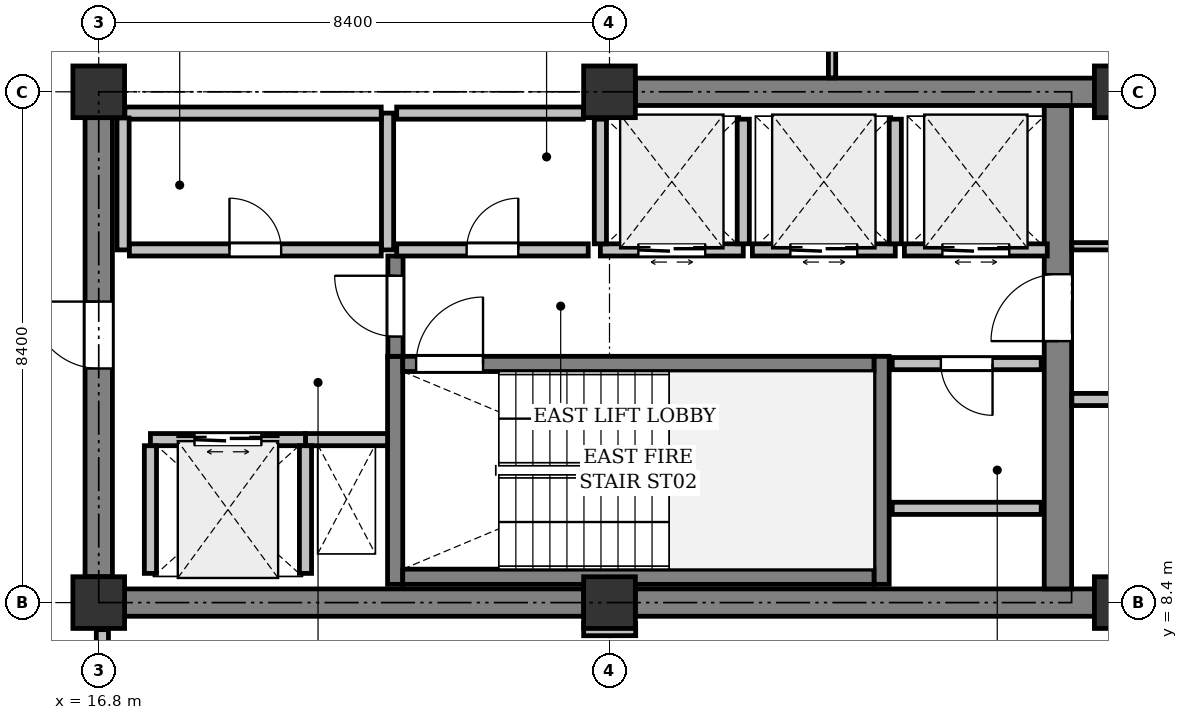
"""IFC4 building model, lengths in metres.
Left out: names, types, materials, properties, quantities, classifications, styles, units other than length and angle.
Written with IfcOpenShell. Run it as: python <this file> out.ifc"""

import sys

from ifc_helpers import new_model, si_unit, direction, frame, frame_2d, origin, origin_2d, place, context, subcontext, project, spatial, rectangle, extrude, element, fill, save


model = new_model("IFC4")
c1 = context("Model", 3, precision=1e-05, world=origin(), true_north=direction((0.0, 1.0)))
c2 = subcontext(c1, "Body", "Model", "MODEL_VIEW")
j1 = project(units=[si_unit("LENGTHUNIT", "METRE"), si_unit("PLANEANGLEUNIT", "RADIAN")], contexts=[c1])
p1 = place(None, origin())
s1 = spatial("IfcSite", under=j1, at=p1, CompositionType="ELEMENT")
p2 = place(p1, origin())
s2 = spatial("IfcBuilding", under=s1, at=p2, CompositionType="ELEMENT")
p3 = place(p2, frame((0.0, 0.0, 274.2)))
s3 = spatial("IfcBuildingStorey", under=s2, at=p3, CompositionType="ELEMENT", Elevation=274.2)
for number, where, z_axis, x_axis in (
    (1, (16.8, 8.4, 0.0), (0.0, 0.0, 1.0), (1.0, 0.0, 0.0)),
    (2, (16.8, 16.8, 0.0), (0.0, 0.0, 1.0), (1.0, 0.0, 0.0)),
    (3, (25.2, 8.4, 0.0), (0.0, 0.0, 1.0), (1.0, 0.0, 0.0)),
    (4, (25.2, 16.8, 0.0), (0.0, 0.0, 1.0), (1.0, 0.0, 0.0)),
    (5, (33.6, 8.4, 0.0), (0.0, 0.0, 1.0), (1.0, 0.0, 0.0)),
    (6, (33.6, 16.8, 0.0), (0.0, 0.0, 1.0), (1.0, 0.0, 0.0)),
):
    element("IfcColumn", number, at=place(p3, frame(where, z_axis=z_axis, x_axis=x_axis)), inside=s3, PredefinedType="COLUMN", context=c2, shape_type="SweptSolid", body=[
        extrude(rectangle(XDim=0.85, YDim=0.85, at=origin_2d()), origin(), (0.0, 0.0, 1.0), 4.0),
    ])
p4 = place(p3, frame((17.225, 8.4, 0.0), z_axis=(0.0, 0.0, 1.0), x_axis=(1.0, 0.0, 0.0)))
e7 = element("IfcWall", 7, at=p4, inside=s3, PredefinedType="SHEAR", context=c2, shape_type="SweptSolid", body=[
    extrude(rectangle(XDim=7.55, YDim=0.45, at=frame_2d((3.775, 0.0))), origin(), (0.0, 0.0, 1.0), 3.725),
])
p5 = place(p3, frame((25.625, 8.4, 0.0), z_axis=(0.0, 0.0, 1.0), x_axis=(1.0, 0.0, 0.0)))
e8 = element("IfcWall", 8, at=p5, inside=s3, PredefinedType="SHEAR", context=c2, shape_type="SweptSolid", body=[
    extrude(rectangle(XDim=7.55, YDim=0.45, at=frame_2d((3.775, 0.0))), origin(), (0.0, 0.0, 1.0), 3.725),
])
p6 = place(p3, frame((32.575, 8.625, 0.0), z_axis=(0.0, 0.0, 1.0), x_axis=(0.0, 1.0, 0.0)))
e9 = element("IfcWall", 9, at=p6, inside=s3, PredefinedType="SHEAR", context=c2, shape_type="SweptSolid", body=[
    extrude(rectangle(XDim=7.95, YDim=0.45, at=frame_2d((3.975, 0.0))), origin(), (0.0, 0.0, 1.0), 3.725),
])
p7 = place(p6, frame((4.075, 0.0, 0.0)))
e10 = element("IfcOpeningElement", 10, at=p7, cuts=e9, PredefinedType="OPENING", context=c2, shape_type="SweptSolid", body=[
    extrude(rectangle(XDim=1.1, YDim=2.15, at=frame_2d((0.55, 1.075))), frame((0.0, 0.235, 0.0), z_axis=(0.0, -1.0, 0.0), x_axis=(1.0, 0.0, 0.0)), (0.0, 0.0, 1.0), 0.47),
])
p8 = place(p3, frame((16.8, 8.825, 0.0), z_axis=(0.0, 0.0, 1.0), x_axis=(0.0, 1.0, 0.0)))
e11 = element("IfcWall", 11, at=p8, inside=s3, PredefinedType="SHEAR", context=c2, shape_type="SweptSolid", body=[
    extrude(rectangle(XDim=7.55, YDim=0.45, at=frame_2d((3.775, 0.0))), origin(), (0.0, 0.0, 1.0), 3.725),
])
p9 = place(p8, frame((3.425, 0.0, 0.0)))
e12 = element("IfcOpeningElement", 12, at=p9, cuts=e11, PredefinedType="OPENING", context=c2, shape_type="SweptSolid", body=[
    extrude(rectangle(XDim=1.1, YDim=2.15, at=frame_2d((0.55, 1.075))), frame((0.0, 0.235, 0.0), z_axis=(0.0, -1.0, 0.0), x_axis=(1.0, 0.0, 0.0)), (0.0, 0.0, 1.0), 0.47),
])
p10 = place(p3, frame((25.625, 16.8, 0.0), z_axis=(0.0, 0.0, 1.0), x_axis=(1.0, 0.0, 0.0)))
e13 = element("IfcWall", 13, at=p10, inside=s3, PredefinedType="SHEAR", context=c2, shape_type="SweptSolid", body=[
    extrude(rectangle(XDim=7.55, YDim=0.45, at=frame_2d((3.775, 0.0))), origin(), (0.0, 0.0, 1.0), 3.725),
])
for number, where, z_axis, x_axis in (
    (14, (21.675, 8.7, 0.0), (0.0, 0.0, 1.0), (0.0, 1.0, 0.0)),
    (15, (29.675, 8.7, 0.0), (0.0, 0.0, 1.0), (0.0, 1.0, 0.0)),
):
    element("IfcWall", number, at=place(p3, frame(where, z_axis=z_axis, x_axis=x_axis)), inside=s3, PredefinedType="SHEAR", context=c2, shape_type="SweptSolid", body=[
        extrude(rectangle(XDim=3.75, YDim=0.25, at=frame_2d((1.875, 0.0))), origin(), (0.0, 0.0, 1.0), 3.725),
    ])
p11 = place(p3, frame((21.8, 8.825, 0.0), z_axis=(0.0, 0.0, 1.0), x_axis=(1.0, 0.0, 0.0)))
e16 = element("IfcWall", 16, at=p11, inside=s3, PredefinedType="SHEAR", context=c2, shape_type="SweptSolid", body=[
    extrude(rectangle(XDim=7.75, YDim=0.25, at=frame_2d((3.875, 0.0))), origin(), (0.0, 0.0, 1.0), 3.725),
])
p12 = place(p3, frame((21.8, 12.325, 0.0), z_axis=(0.0, 0.0, 1.0), x_axis=(1.0, 0.0, 0.0)))
e17 = element("IfcWall", 17, at=p12, inside=s3, PredefinedType="SHEAR", context=c2, shape_type="SweptSolid", body=[
    extrude(rectangle(XDim=7.75, YDim=0.25, at=frame_2d((3.875, 0.0))), origin(), (0.0, 0.0, 1.0), 3.725),
])
p13 = place(p12, frame((0.22, 0.0, 0.0)))
e18 = element("IfcOpeningElement", 18, at=p13, cuts=e17, PredefinedType="OPENING", context=c2, shape_type="SweptSolid", body=[
    extrude(rectangle(XDim=1.1, YDim=2.15, at=frame_2d((0.55, 1.075))), frame((0.0, 0.135, 0.0), z_axis=(0.0, -1.0, 0.0), x_axis=(1.0, 0.0, 0.0)), (0.0, 0.0, 1.0), 0.27),
])
p14 = place(p3, frame((20.2, 11.08, 0.0), z_axis=(0.0, 0.0, 1.0), x_axis=(1.0, 0.0, 0.0)))
e19 = element("IfcWall", 19, at=p14, inside=s3, PredefinedType="PARTITIONING", context=c2, shape_type="SweptSolid", body=[
    extrude(rectangle(XDim=1.35, YDim=0.2, at=frame_2d((0.675, 0.0))), origin(), (0.0, 0.0, 1.0), 3.725),
])
p15 = place(p3, frame((21.68, 12.45, 0.0), z_axis=(0.0, 0.0, 1.0), x_axis=(0.0, 1.0, 0.0)))
e20 = element("IfcWall", 20, at=p15, inside=s3, PredefinedType="SHEAR", context=c2, shape_type="SweptSolid", body=[
    extrude(rectangle(XDim=1.65, YDim=0.25, at=frame_2d((0.825, 0.0))), origin(), (0.0, 0.0, 1.0), 3.725),
])
p16 = place(p15, frame((0.325, 0.0, 0.0)))
e21 = element("IfcOpeningElement", 21, at=p16, cuts=e20, PredefinedType="OPENING", context=c2, shape_type="SweptSolid", body=[
    extrude(rectangle(XDim=1.0, YDim=2.15, at=frame_2d((0.5, 1.075))), frame((0.0, 0.135, 0.0), z_axis=(0.0, -1.0, 0.0), x_axis=(1.0, 0.0, 0.0)), (0.0, 0.0, 1.0), 0.27),
])
p17 = place(p3, frame((17.65, 11.08, 0.0), z_axis=(0.0, 0.0, 1.0), x_axis=(1.0, 0.0, 0.0)))
e22 = element("IfcWall", 22, at=p17, inside=s3, PredefinedType="PARTITIONING", context=c2, shape_type="SweptSolid", body=[
    extrude(rectangle(XDim=2.55, YDim=0.2, at=frame_2d((1.275, 0.0))), origin(), (0.0, 0.0, 1.0), 3.725),
])
p18 = place(p17, frame((0.725, 0.0, 0.0)))
e23 = element("IfcOpeningElement", 23, at=p18, cuts=e22, PredefinedType="OPENING", context=c2, shape_type="SweptSolid", body=[
    extrude(rectangle(XDim=1.1, YDim=2.2, at=frame_2d((0.55, 1.1))), frame((0.0, 0.11, 0.0), z_axis=(0.0, -1.0, 0.0), x_axis=(1.0, 0.0, 0.0)), (0.0, 0.0, 1.0), 0.22),
])
for number, where, z_axis, x_axis in (
    (24, (20.2, 8.88, 0.0), (0.0, 0.0, 1.0), (0.0, 1.0, 0.0)),
    (25, (17.65, 8.88, 0.0), (0.0, 0.0, 1.0), (0.0, 1.0, 0.0)),
):
    element("IfcWall", number, at=place(p3, frame(where, z_axis=z_axis, x_axis=x_axis)), inside=s3, PredefinedType="PARTITIONING", context=c2, shape_type="SweptSolid", body=[
        extrude(rectangle(XDim=2.1, YDim=0.2, at=frame_2d((1.05, 0.0))), origin(), (0.0, 0.0, 1.0), 3.725),
    ])
p19 = place(p3, frame((25.05, 14.2, 0.0), z_axis=(0.0, 0.0, 1.0), x_axis=(1.0, 0.0, 0.0)))
e26 = element("IfcWall", 26, at=p19, inside=s3, PredefinedType="PARTITIONING", context=c2, shape_type="SweptSolid", body=[
    extrude(rectangle(XDim=2.35, YDim=0.2, at=frame_2d((1.175, 0.0))), origin(), (0.0, 0.0, 1.0), 3.725),
])
p20 = place(p19, frame((0.625, 0.0, 0.0)))
e27 = element("IfcOpeningElement", 27, at=p20, cuts=e26, PredefinedType="OPENING", context=c2, shape_type="SweptSolid", body=[
    extrude(rectangle(XDim=1.1, YDim=2.2, at=frame_2d((0.55, 1.1))), frame((0.0, 0.11, 0.0), z_axis=(0.0, -1.0, 0.0), x_axis=(1.0, 0.0, 0.0)), (0.0, 0.0, 1.0), 0.22),
])
for number, where, z_axis, x_axis in (
    (28, (27.4, 14.3, 0.0), (0.0, 0.0, 1.0), (0.0, 1.0, 0.0)),
    (29, (25.05, 14.3, 0.0), (0.0, 0.0, 1.0), (0.0, 1.0, 0.0)),
):
    element("IfcWall", number, at=place(p3, frame(where, z_axis=z_axis, x_axis=x_axis)), inside=s3, PredefinedType="PARTITIONING", context=c2, shape_type="SweptSolid", body=[
        extrude(rectangle(XDim=2.05, YDim=0.2, at=frame_2d((1.025, 0.0))), origin(), (0.0, 0.0, 1.0), 3.725),
    ])
p21 = place(p3, frame((27.55, 14.2, 0.0), z_axis=(0.0, 0.0, 1.0), x_axis=(1.0, 0.0, 0.0)))
e30 = element("IfcWall", 30, at=p21, inside=s3, PredefinedType="PARTITIONING", context=c2, shape_type="SweptSolid", body=[
    extrude(rectangle(XDim=2.35, YDim=0.2, at=frame_2d((1.175, 0.0))), origin(), (0.0, 0.0, 1.0), 3.725),
])
p22 = place(p21, frame((0.625, 0.0, 0.0)))
e31 = element("IfcOpeningElement", 31, at=p22, cuts=e30, PredefinedType="OPENING", context=c2, shape_type="SweptSolid", body=[
    extrude(rectangle(XDim=1.1, YDim=2.2, at=frame_2d((0.55, 1.1))), frame((0.0, 0.11, 0.0), z_axis=(0.0, -1.0, 0.0), x_axis=(1.0, 0.0, 0.0)), (0.0, 0.0, 1.0), 0.22),
])
p23 = place(p3, frame((29.9, 14.3, 0.0), z_axis=(0.0, 0.0, 1.0), x_axis=(0.0, 1.0, 0.0)))
e32 = element("IfcWall", 32, at=p23, inside=s3, PredefinedType="PARTITIONING", context=c2, shape_type="SweptSolid", body=[
    extrude(rectangle(XDim=2.05, YDim=0.2, at=frame_2d((1.025, 0.0))), origin(), (0.0, 0.0, 1.0), 3.725),
])
p24 = place(p3, frame((30.05, 14.2, 0.0), z_axis=(0.0, 0.0, 1.0), x_axis=(1.0, 0.0, 0.0)))
e33 = element("IfcWall", 33, at=p24, inside=s3, PredefinedType="PARTITIONING", context=c2, shape_type="SweptSolid", body=[
    extrude(rectangle(XDim=2.35, YDim=0.2, at=frame_2d((1.175, 0.0))), origin(), (0.0, 0.0, 1.0), 3.725),
])
p25 = place(p24, frame((0.625, 0.0, 0.0)))
e34 = element("IfcOpeningElement", 34, at=p25, cuts=e33, PredefinedType="OPENING", context=c2, shape_type="SweptSolid", body=[
    extrude(rectangle(XDim=1.1, YDim=2.2, at=frame_2d((0.55, 1.1))), frame((0.0, 0.11, 0.0), z_axis=(0.0, -1.0, 0.0), x_axis=(1.0, 0.0, 0.0)), (0.0, 0.0, 1.0), 0.22),
])
p26 = place(p3, frame((21.55, 14.2, 0.0), z_axis=(0.0, 0.0, 1.0), x_axis=(0.0, 1.0, 0.0)))
e35 = element("IfcWall", 35, at=p26, inside=s3, PredefinedType="PARTITIONING", context=c2, shape_type="SweptSolid", body=[
    extrude(rectangle(XDim=2.25, YDim=0.2, at=frame_2d((1.125, 0.0))), origin(), (0.0, 0.0, 1.0), 3.725),
])
p27 = place(p3, frame((21.446, 16.45, 0.0), z_axis=(0.0, 0.0, 1.0), x_axis=(-1.0, 0.0, 0.0)))
e36 = element("IfcWall", 36, at=p27, inside=s3, PredefinedType="PARTITIONING", context=c2, shape_type="SweptSolid", body=[
    extrude(rectangle(XDim=4.216, YDim=0.2, at=frame_2d((2.108, 0.0))), origin(), (0.0, 0.0, 1.0), 3.725),
])
p28 = place(p3, frame((17.2, 16.37, 0.0), z_axis=(0.0, 0.0, 1.0), x_axis=(0.0, -1.0, 0.0)))
e37 = element("IfcWall", 37, at=p28, inside=s3, PredefinedType="PARTITIONING", context=c2, shape_type="SweptSolid", body=[
    extrude(rectangle(XDim=2.17, YDim=0.2, at=frame_2d((1.085, 0.0))), origin(), (0.0, 0.0, 1.0), 3.725),
])
p29 = place(p3, frame((17.304, 14.2, 0.0), z_axis=(0.0, 0.0, 1.0), x_axis=(1.0, 0.0, 0.0)))
e38 = element("IfcWall", 38, at=p29, inside=s3, PredefinedType="PARTITIONING", context=c2, shape_type="SweptSolid", body=[
    extrude(rectangle(XDim=4.142, YDim=0.2, at=frame_2d((2.071, 0.0))), origin(), (0.0, 0.0, 1.0), 3.725),
])
p30 = place(p29, frame((1.646, 0.0, 0.0)))
e39 = element("IfcOpeningElement", 39, at=p30, cuts=e38, PredefinedType="OPENING", context=c2, shape_type="SweptSolid", body=[
    extrude(rectangle(XDim=0.85, YDim=2.15, at=frame_2d((0.425, 1.075))), frame((0.0, 0.11, 0.0), z_axis=(0.0, -1.0, 0.0), x_axis=(1.0, 0.0, 0.0)), (0.0, 0.0, 1.0), 0.22),
])
p31 = place(p3, frame((24.77, 16.45, 0.0), z_axis=(0.0, 0.0, 1.0), x_axis=(-1.0, 0.0, 0.0)))
e40 = element("IfcWall", 40, at=p31, inside=s3, PredefinedType="PARTITIONING", context=c2, shape_type="SweptSolid", body=[
    extrude(rectangle(XDim=3.07, YDim=0.2, at=frame_2d((1.535, 0.0))), origin(), (0.0, 0.0, 1.0), 3.725),
])
p32 = place(p3, frame((21.7, 14.2, 0.0), z_axis=(0.0, 0.0, 1.0), x_axis=(1.0, 0.0, 0.0)))
e41 = element("IfcWall", 41, at=p32, inside=s3, PredefinedType="PARTITIONING", context=c2, shape_type="SweptSolid", body=[
    extrude(rectangle(XDim=3.15, YDim=0.2, at=frame_2d((1.575, 0.0))), origin(), (0.0, 0.0, 1.0), 3.725),
])
p33 = place(p32, frame((1.15, 0.0, 0.0)))
e42 = element("IfcOpeningElement", 42, at=p33, cuts=e41, PredefinedType="OPENING", context=c2, shape_type="SweptSolid", body=[
    extrude(rectangle(XDim=0.85, YDim=2.15, at=frame_2d((0.425, 1.075))), frame((0.0, 0.11, 0.0), z_axis=(0.0, -1.0, 0.0), x_axis=(1.0, 0.0, 0.0)), (0.0, 0.0, 1.0), 0.22),
])
p34 = place(p3, frame((32.3, 12.33, 0.0), z_axis=(0.0, 0.0, 1.0), x_axis=(-1.0, 0.0, 0.0)))
e43 = element("IfcWall", 43, at=p34, inside=s3, PredefinedType="PARTITIONING", context=c2, shape_type="SweptSolid", body=[
    extrude(rectangle(XDim=2.45, YDim=0.2, at=frame_2d((1.225, 0.0))), origin(), (0.0, 0.0, 1.0), 3.725),
])
p35 = place(p34, frame((0.8, 0.0, 0.0)))
e44 = element("IfcOpeningElement", 44, at=p35, cuts=e43, PredefinedType="OPENING", context=c2, shape_type="SweptSolid", body=[
    extrude(rectangle(XDim=0.85, YDim=2.15, at=frame_2d((0.425, 1.075))), frame((0.0, 0.11, 0.0), z_axis=(0.0, -1.0, 0.0), x_axis=(1.0, 0.0, 0.0)), (0.0, 0.0, 1.0), 0.22),
])
p36 = place(p3, frame((29.85, 9.95, 0.0), z_axis=(0.0, 0.0, 1.0), x_axis=(1.0, 0.0, 0.0)))
e45 = element("IfcWall", 45, at=p36, inside=s3, PredefinedType="PARTITIONING", context=c2, shape_type="SweptSolid", body=[
    extrude(rectangle(XDim=2.45, YDim=0.2, at=frame_2d((1.225, 0.0))), origin(), (0.0, 0.0, 1.0), 3.725),
])
p37 = place(p3, frame((28.86, 19.05, 0.0), z_axis=(0.0, 0.0, 1.0), x_axis=(0.0, -1.0, 0.0)))
e46 = element("IfcWall", 46, at=p37, inside=s3, PredefinedType="PARTITIONING", context=c2, shape_type="SweptSolid", body=[
    extrude(rectangle(XDim=2.021, YDim=0.12, at=frame_2d((1.01, 0.0))), origin(), (0.0, 0.0, 1.0), 3.725),
])
p38 = place(p3, frame((32.804, 14.26, 0.0), z_axis=(0.0, 0.0, 1.0), x_axis=(1.0, 0.0, 0.0)))
e47 = element("IfcWall", 47, at=p38, inside=s3, PredefinedType="PARTITIONING", context=c2, shape_type="SweptSolid", body=[
    extrude(rectangle(XDim=1.536, YDim=0.12, at=frame_2d((0.768, 0.0))), origin(), (0.0, 0.0, 1.0), 3.319),
])
p39 = place(p3, frame((34.236, 11.74, 0.0), z_axis=(0.0, 0.0, 1.0), x_axis=(-1.0, 0.0, 0.0)))
e48 = element("IfcWall", 48, at=p39, inside=s3, PredefinedType="PARTITIONING", context=c2, shape_type="SweptSolid", body=[
    extrude(rectangle(XDim=1.432, YDim=0.2, at=frame_2d((0.716, 0.0))), origin(), (0.0, 0.0, 1.0), 3.319),
])
p40 = place(p3, frame((25.631, 7.956, 0.0), z_axis=(0.0, 0.0, 1.0), x_axis=(-0.99999963391, -0.000855675671, 0.0)))
e49 = element("IfcWall", 49, at=p40, inside=s3, PredefinedType="PARTITIONING", context=c2, shape_type="SweptSolid", body=[
    extrude(rectangle(XDim=0.856, YDim=0.2, at=frame_2d((0.428, 0.0))), origin(), (0.0, 0.0, 1.0), 3.319),
])
p41 = place(p3, frame((16.86, 7.955, 0.0), z_axis=(0.0, 0.0, 1.0), x_axis=(0.0, -1.0, 0.0)))
e50 = element("IfcWall", 50, at=p41, inside=s3, PredefinedType="PARTITIONING", context=c2, shape_type="SweptSolid", body=[
    extrude(rectangle(XDim=2.555, YDim=0.2, at=frame_2d((1.278, 0.0))), origin(), (0.0, 0.0, 1.0), 3.319),
])
p42 = place(p7, origin())
e51 = element("IfcDoor", 51, at=p42, inside=s3, OperationType="SINGLE_SWING_LEFT", PredefinedType="DOOR", context=c2, shape_type="SweptSolid", body=[
    extrude(rectangle(XDim=1.1, YDim=2.15, at=frame_2d((0.55, 1.075))), frame((0.0, 0.025, 0.0), z_axis=(0.0, -1.0, 0.0), x_axis=(1.0, 0.0, 0.0)), (0.0, 0.0, 1.0), 0.05),
])
fill(e10, e51)
p43 = place(p9, origin())
e52 = element("IfcDoor", 52, at=p43, inside=s3, OperationType="SINGLE_SWING_RIGHT", PredefinedType="DOOR", context=c2, shape_type="SweptSolid", body=[
    extrude(rectangle(XDim=1.1, YDim=2.15, at=frame_2d((0.55, 1.075))), frame((0.0, 0.025, 0.0), z_axis=(0.0, -1.0, 0.0), x_axis=(1.0, 0.0, 0.0)), (0.0, 0.0, 1.0), 0.05),
])
fill(e12, e52)
p44 = place(p13, origin())
e53 = element("IfcDoor", 53, at=p44, inside=s3, OperationType="SINGLE_SWING_RIGHT", PredefinedType="DOOR", context=c2, shape_type="SweptSolid", body=[
    extrude(rectangle(XDim=1.1, YDim=2.15, at=frame_2d((0.55, 1.075))), frame((0.0, 0.025, 0.0), z_axis=(0.0, -1.0, 0.0), x_axis=(1.0, 0.0, 0.0)), (0.0, 0.0, 1.0), 0.05),
])
fill(e18, e53)
p45 = place(p16, origin())
e54 = element("IfcDoor", 54, at=p45, inside=s3, OperationType="SINGLE_SWING_RIGHT", PredefinedType="DOOR", context=c2, shape_type="SweptSolid", body=[
    extrude(rectangle(XDim=1.0, YDim=2.15, at=frame_2d((0.5, 1.075))), frame((0.0, 0.025, 0.0), z_axis=(0.0, -1.0, 0.0), x_axis=(1.0, 0.0, 0.0)), (0.0, 0.0, 1.0), 0.05),
])
fill(e21, e54)
p46 = place(p18, origin())
e55 = element("IfcDoor", 55, at=p46, inside=s3, OperationType="DOUBLE_DOOR_SLIDING", PredefinedType="DOOR", context=c2, shape_type="SweptSolid", body=[
    extrude(rectangle(XDim=1.1, YDim=2.2, at=frame_2d((0.55, 1.1))), frame((0.0, 0.025, 0.0), z_axis=(0.0, -1.0, 0.0), x_axis=(1.0, 0.0, 0.0)), (0.0, 0.0, 1.0), 0.05),
])
fill(e23, e55)
p47 = place(p20, origin())
e56 = element("IfcDoor", 56, at=p47, inside=s3, OperationType="DOUBLE_DOOR_SLIDING", PredefinedType="DOOR", context=c2, shape_type="SweptSolid", body=[
    extrude(rectangle(XDim=1.1, YDim=2.2, at=frame_2d((0.55, 1.1))), frame((0.0, 0.025, 0.0), z_axis=(0.0, -1.0, 0.0), x_axis=(1.0, 0.0, 0.0)), (0.0, 0.0, 1.0), 0.05),
])
fill(e27, e56)
p48 = place(p22, origin())
e57 = element("IfcDoor", 57, at=p48, inside=s3, OperationType="DOUBLE_DOOR_SLIDING", PredefinedType="DOOR", context=c2, shape_type="SweptSolid", body=[
    extrude(rectangle(XDim=1.1, YDim=2.2, at=frame_2d((0.55, 1.1))), frame((0.0, 0.025, 0.0), z_axis=(0.0, -1.0, 0.0), x_axis=(1.0, 0.0, 0.0)), (0.0, 0.0, 1.0), 0.05),
])
fill(e31, e57)
p49 = place(p25, origin())
e58 = element("IfcDoor", 58, at=p49, inside=s3, OperationType="DOUBLE_DOOR_SLIDING", PredefinedType="DOOR", context=c2, shape_type="SweptSolid", body=[
    extrude(rectangle(XDim=1.1, YDim=2.2, at=frame_2d((0.55, 1.1))), frame((0.0, 0.025, 0.0), z_axis=(0.0, -1.0, 0.0), x_axis=(1.0, 0.0, 0.0)), (0.0, 0.0, 1.0), 0.05),
])
fill(e34, e58)
p50 = place(p30, origin())
e59 = element("IfcDoor", 59, at=p50, inside=s3, OperationType="SINGLE_SWING_LEFT", PredefinedType="DOOR", context=c2, shape_type="SweptSolid", body=[
    extrude(rectangle(XDim=0.85, YDim=2.15, at=frame_2d((0.425, 1.075))), frame((0.0, 0.025, 0.0), z_axis=(0.0, -1.0, 0.0), x_axis=(1.0, 0.0, 0.0)), (0.0, 0.0, 1.0), 0.05),
])
fill(e39, e59)
p51 = place(p33, origin())
e60 = element("IfcDoor", 60, at=p51, inside=s3, OperationType="SINGLE_SWING_RIGHT", PredefinedType="DOOR", context=c2, shape_type="SweptSolid", body=[
    extrude(rectangle(XDim=0.85, YDim=2.15, at=frame_2d((0.425, 1.075))), frame((0.0, 0.025, 0.0), z_axis=(0.0, -1.0, 0.0), x_axis=(1.0, 0.0, 0.0)), (0.0, 0.0, 1.0), 0.05),
])
fill(e42, e60)
p52 = place(p35, origin())
e61 = element("IfcDoor", 61, at=p52, inside=s3, OperationType="SINGLE_SWING_LEFT", PredefinedType="DOOR", context=c2, shape_type="SweptSolid", body=[
    extrude(rectangle(XDim=0.85, YDim=2.15, at=frame_2d((0.425, 1.075))), frame((0.0, 0.025, 0.0), z_axis=(0.0, -1.0, 0.0), x_axis=(1.0, 0.0, 0.0)), (0.0, 0.0, 1.0), 0.05),
])
fill(e44, e61)
save(model, sys.argv[1])
